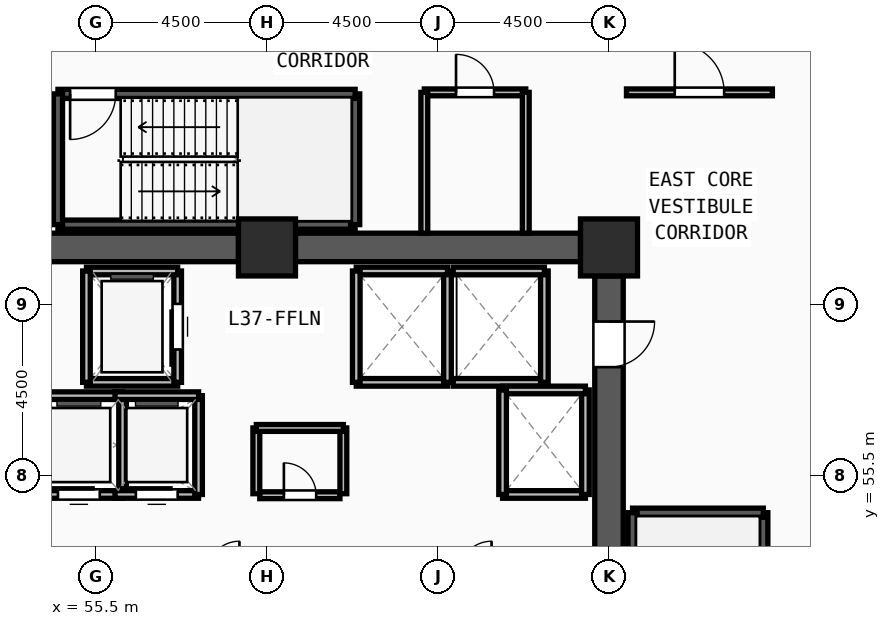
"""IFC4 building model, lengths in metres.
Left out: names, types, materials, properties, quantities, classifications, styles, units other than length and angle.
Written with IfcOpenShell. Run it as: python <this file> out.ifc"""

import sys

from ifc_helpers import new_model, si_unit, direction, frame, frame_2d, origin, origin_2d, place, context, subcontext, project, spatial, rectangle, extrude, source, transform, mapped, element, fill, save


model = new_model("IFC4")
c1 = context("Model", 3, precision=1e-05, world=origin(), true_north=direction((0.0, 1.0)))
c2 = subcontext(c1, "Body", "Model", "MODEL_VIEW")
j1 = project(units=[si_unit("LENGTHUNIT", "METRE"), si_unit("PLANEANGLEUNIT", "RADIAN")], contexts=[c1])
p1 = place(None, origin())
s1 = spatial("IfcSite", under=j1, at=p1, CompositionType="ELEMENT")
p2 = place(p1, origin())
s2 = spatial("IfcBuilding", under=s1, at=p2, CompositionType="ELEMENT")
p3 = place(p2, frame((0.0, 0.0, 144.0)))
s3 = spatial("IfcBuildingStorey", under=s2, at=p3, CompositionType="ELEMENT", Elevation=144.0)
m1 = source(origin(), c2, "Body", "SweptSolid", [
    extrude(rectangle(XDim=1.5, YDim=1.5, at=origin_2d()), origin(), (0.0, 0.0, 1.0), 3.75),
])
for number, where, z_axis, x_axis in (
    (1, (69.0, 61.5, 0.0), (0.0, 0.0, 1.0), (1.0, 0.0, 0.0)),
    (2, (60.0, 61.5, 0.0), (0.0, 0.0, 1.0), (1.0, 0.0, 0.0)),
):
    element("IfcColumn", number, at=place(p3, frame(where, z_axis=z_axis, x_axis=x_axis)), inside=s3, PredefinedType="COLUMN", context=c2, shape_type="MappedRepresentation", body=[
        mapped(m1, transform((0.0, 0.0, 0.0), x_axis=(1.0, 0.0, 0.0), y_axis=(0.0, 1.0, 0.0), z_axis=(0.0, 0.0, 1.0), scale=1.0)),
    ])
for number, where, z_axis, x_axis in (
    (3, (51.75, 61.5, 0.0), (0.0, 0.0, 1.0), (1.0, 0.0, 0.0)),
    (4, (60.75, 61.5, 0.0), (0.0, 0.0, 1.0), (1.0, 0.0, 0.0)),
):
    element("IfcWall", number, at=place(p3, frame(where, z_axis=z_axis, x_axis=x_axis)), inside=s3, PredefinedType="SHEAR", context=c2, shape_type="SweptSolid", body=[
        extrude(rectangle(XDim=7.5, YDim=0.75, at=frame_2d((3.75, 0.0))), origin(), (0.0, 0.0, 1.0), 3.57),
    ])
p4 = place(p3, frame((69.0, 60.75, 0.0), z_axis=(0.0, 0.0, 1.0), x_axis=(0.0, -1.0, 0.0)))
e5 = element("IfcWall", 5, at=p4, inside=s3, PredefinedType="SHEAR", context=c2, shape_type="SweptSolid", body=[
    extrude(rectangle(XDim=13.5, YDim=0.75, at=frame_2d((6.75, 0.0))), origin(), (0.0, 0.0, 1.0), 3.57),
])
m2 = source(origin(), c2, "Body", "SweptSolid", [
    extrude(rectangle(XDim=1.2, YDim=2.2, at=frame_2d((0.6, 1.1))), frame((0.0, 0.385, 0.0), z_axis=(0.0, -1.0, 0.0), x_axis=(1.0, 0.0, 0.0)), (0.0, 0.0, 1.0), 0.77),
])
p5 = place(p4, frame((1.2, 0.0, 0.0)))
e6 = element("IfcOpeningElement", 6, at=p5, cuts=e5, PredefinedType="OPENING", context=c2, shape_type="MappedRepresentation", body=[
    mapped(m2, transform((0.0, 0.0, 0.0), x_axis=(1.0, 0.0, 0.0), y_axis=(0.0, 1.0, 0.0), z_axis=(0.0, 0.0, 1.0), scale=1.0)),
])
p6 = place(p3, frame((73.06, 46.7, 0.0), z_axis=(0.0, 0.0, 1.0), x_axis=(0.0, 1.0, 0.0)))
e7 = element("IfcWall", 7, at=p6, inside=s3, PredefinedType="SOLIDWALL", context=c2, shape_type="SweptSolid", body=[
    extrude(rectangle(XDim=7.82, YDim=0.24, at=frame_2d((3.91, 0.0))), origin(), (0.0, 0.0, 1.0), 3.57),
])
m3 = source(origin(), c2, "Body", "SweptSolid", [
    extrude(rectangle(XDim=1.2, YDim=2.2, at=frame_2d((0.6, 1.1))), frame((0.0, 0.13, 0.0), z_axis=(0.0, -1.0, 0.0), x_axis=(1.0, 0.0, 0.0)), (0.0, 0.0, 1.0), 0.26),
])
p7 = place(p6, frame((0.32, 0.0, 0.0)))
e8 = element("IfcOpeningElement", 8, at=p7, cuts=e7, PredefinedType="OPENING", context=c2, shape_type="MappedRepresentation", body=[
    mapped(m3, transform((0.0, 0.0, 0.0), x_axis=(1.0, 0.0, 0.0), y_axis=(0.0, 1.0, 0.0), z_axis=(0.0, 0.0, 1.0), scale=1.0)),
])
p8 = place(p3, frame((73.06, 54.52, 0.0), z_axis=(0.0, 0.0, 1.0), x_axis=(-1.0, 0.0, 0.0)))
e9 = element("IfcWall", 9, at=p8, inside=s3, PredefinedType="SOLIDWALL", context=c2, shape_type="SweptSolid", body=[
    extrude(rectangle(XDim=3.44, YDim=0.24, at=frame_2d((1.72, 0.0))), origin(), (0.0, 0.0, 1.0), 3.57),
])
for number, where, z_axis, x_axis in (
    (10, (69.62, 54.52, 0.0), (0.0, 0.0, 1.0), (0.0, -1.0, 0.0)),
    (11, (54.5, 62.1, 0.0), (0.0, 0.0, 1.0), (1.0, 0.0, 0.0)),
):
    element("IfcWall", number, at=place(p3, frame(where, z_axis=z_axis, x_axis=x_axis)), inside=s3, PredefinedType="SOLIDWALL", context=c2, shape_type="SweptSolid", body=[
        extrude(rectangle(XDim=7.82, YDim=0.24, at=frame_2d((3.91, 0.0))), origin(), (0.0, 0.0, 1.0), 3.57),
    ])
p9 = place(p3, frame((62.32, 62.1, 0.0), z_axis=(0.0, 0.0, 1.0), x_axis=(0.0, 1.0, 0.0)))
e12 = element("IfcWall", 12, at=p9, inside=s3, PredefinedType="SOLIDWALL", context=c2, shape_type="SweptSolid", body=[
    extrude(rectangle(XDim=3.44, YDim=0.24, at=frame_2d((1.72, 0.0))), origin(), (0.0, 0.0, 1.0), 3.57),
])
p10 = place(p3, frame((62.32, 65.54, 0.0), z_axis=(0.0, 0.0, 1.0), x_axis=(-1.0, 0.0, 0.0)))
e13 = element("IfcWall", 13, at=p10, inside=s3, PredefinedType="SOLIDWALL", context=c2, shape_type="SweptSolid", body=[
    extrude(rectangle(XDim=7.82, YDim=0.24, at=frame_2d((3.91, 0.0))), origin(), (0.0, 0.0, 1.0), 3.57),
])
p11 = place(p10, frame((6.3, 0.0, 0.0)))
e14 = element("IfcOpeningElement", 14, at=p11, cuts=e13, PredefinedType="OPENING", context=c2, shape_type="MappedRepresentation", body=[
    mapped(m3, transform((0.0, 0.0, 0.0), x_axis=(1.0, 0.0, 0.0), y_axis=(0.0, 1.0, 0.0), z_axis=(0.0, 0.0, 1.0), scale=1.0)),
])
p12 = place(p3, frame((54.5, 65.54, 0.0), z_axis=(0.0, 0.0, 1.0), x_axis=(0.0, -1.0, 0.0)))
e15 = element("IfcWall", 15, at=p12, inside=s3, PredefinedType="SOLIDWALL", context=c2, shape_type="SweptSolid", body=[
    extrude(rectangle(XDim=3.44, YDim=0.24, at=frame_2d((1.72, 0.0))), origin(), (0.0, 0.0, 1.0), 3.57),
])
p13 = place(p3, frame((55.25, 57.95, 0.0), z_axis=(0.0, 0.0, 1.0), x_axis=(1.0, 0.0, 0.0)))
e16 = element("IfcWall", 16, at=p13, inside=s3, PredefinedType="SOLIDWALL", context=c2, shape_type="SweptSolid", body=[
    extrude(rectangle(XDim=2.4, YDim=0.2, at=frame_2d((1.2, 0.0))), origin(), (0.0, 0.0, 1.0), 3.57),
])
p14 = place(p3, frame((57.65, 57.95, 0.0), z_axis=(0.0, 0.0, 1.0), x_axis=(0.0, 1.0, 0.0)))
e17 = element("IfcWall", 17, at=p14, inside=s3, PredefinedType="SOLIDWALL", context=c2, shape_type="SweptSolid", body=[
    extrude(rectangle(XDim=2.93, YDim=0.2, at=frame_2d((1.465, 0.0))), origin(), (0.0, 0.0, 1.0), 3.57),
])
m4 = source(origin(), c2, "Body", "SweptSolid", [
    extrude(rectangle(XDim=1.2, YDim=2.3, at=frame_2d((0.6, 1.15))), frame((0.0, 0.11, 0.0), z_axis=(0.0, -1.0, 0.0), x_axis=(1.0, 0.0, 0.0)), (0.0, 0.0, 1.0), 0.22),
])
p15 = place(p14, frame((0.865, 0.0, 0.0)))
e18 = element("IfcOpeningElement", 18, at=p15, cuts=e17, PredefinedType="OPENING", context=c2, shape_type="MappedRepresentation", body=[
    mapped(m4, transform((0.0, 0.0, 0.0), x_axis=(1.0, 0.0, 0.0), y_axis=(0.0, 1.0, 0.0), z_axis=(0.0, 0.0, 1.0), scale=1.0)),
])
p16 = place(p3, frame((57.65, 60.88, 0.0), z_axis=(0.0, 0.0, 1.0), x_axis=(-1.0, 0.0, 0.0)))
e19 = element("IfcWall", 19, at=p16, inside=s3, PredefinedType="SOLIDWALL", context=c2, shape_type="SweptSolid", body=[
    extrude(rectangle(XDim=2.4, YDim=0.2, at=frame_2d((1.2, 0.0))), origin(), (0.0, 0.0, 1.0), 3.57),
])
p17 = place(p3, frame((55.25, 60.88, 0.0), z_axis=(0.0, 0.0, 1.0), x_axis=(0.0, -1.0, 0.0)))
e20 = element("IfcWall", 20, at=p17, inside=s3, PredefinedType="SOLIDWALL", context=c2, shape_type="SweptSolid", body=[
    extrude(rectangle(XDim=2.93, YDim=0.2, at=frame_2d((1.465, 0.0))), origin(), (0.0, 0.0, 1.0), 3.57),
])
p18 = place(p3, frame((62.35, 57.95, 0.0), z_axis=(0.0, 0.0, 1.0), x_axis=(1.0, 0.0, 0.0)))
e21 = element("IfcWall", 21, at=p18, inside=s3, PredefinedType="SOLIDWALL", context=c2, shape_type="SweptSolid", body=[
    extrude(rectangle(XDim=2.4, YDim=0.2, at=frame_2d((1.2, 0.0))), origin(), (0.0, 0.0, 1.0), 3.57),
])
p19 = place(p3, frame((64.75, 57.95, 0.0), z_axis=(0.0, 0.0, 1.0), x_axis=(0.0, 1.0, 0.0)))
e22 = element("IfcWall", 22, at=p19, inside=s3, PredefinedType="SOLIDWALL", context=c2, shape_type="SweptSolid", body=[
    extrude(rectangle(XDim=2.93, YDim=0.2, at=frame_2d((1.465, 0.0))), origin(), (0.0, 0.0, 1.0), 3.57),
])
p20 = place(p3, frame((64.75, 60.88, 0.0), z_axis=(0.0, 0.0, 1.0), x_axis=(-1.0, 0.0, 0.0)))
e23 = element("IfcWall", 23, at=p20, inside=s3, PredefinedType="SOLIDWALL", context=c2, shape_type="SweptSolid", body=[
    extrude(rectangle(XDim=2.4, YDim=0.2, at=frame_2d((1.2, 0.0))), origin(), (0.0, 0.0, 1.0), 3.57),
])
p21 = place(p3, frame((62.35, 60.88, 0.0), z_axis=(0.0, 0.0, 1.0), x_axis=(0.0, -1.0, 0.0)))
e24 = element("IfcWall", 24, at=p21, inside=s3, PredefinedType="SOLIDWALL", context=c2, shape_type="SweptSolid", body=[
    extrude(rectangle(XDim=2.93, YDim=0.2, at=frame_2d((1.465, 0.0))), origin(), (0.0, 0.0, 1.0), 3.57),
])
p22 = place(p3, frame((64.9, 57.95, 0.0), z_axis=(0.0, 0.0, 1.0), x_axis=(1.0, 0.0, 0.0)))
e25 = element("IfcWall", 25, at=p22, inside=s3, PredefinedType="SOLIDWALL", context=c2, shape_type="SweptSolid", body=[
    extrude(rectangle(XDim=2.4, YDim=0.2, at=frame_2d((1.2, 0.0))), origin(), (0.0, 0.0, 1.0), 3.57),
])
p23 = place(p3, frame((67.3, 57.95, 0.0), z_axis=(0.0, 0.0, 1.0), x_axis=(0.0, 1.0, 0.0)))
e26 = element("IfcWall", 26, at=p23, inside=s3, PredefinedType="SOLIDWALL", context=c2, shape_type="SweptSolid", body=[
    extrude(rectangle(XDim=2.93, YDim=0.2, at=frame_2d((1.465, 0.0))), origin(), (0.0, 0.0, 1.0), 3.57),
])
p24 = place(p3, frame((67.3, 60.88, 0.0), z_axis=(0.0, 0.0, 1.0), x_axis=(-1.0, 0.0, 0.0)))
e27 = element("IfcWall", 27, at=p24, inside=s3, PredefinedType="SOLIDWALL", context=c2, shape_type="SweptSolid", body=[
    extrude(rectangle(XDim=2.4, YDim=0.2, at=frame_2d((1.2, 0.0))), origin(), (0.0, 0.0, 1.0), 3.57),
])
p25 = place(p3, frame((66.2, 55.0, 0.0), z_axis=(0.0, 0.0, 1.0), x_axis=(1.0, 0.0, 0.0)))
e28 = element("IfcWall", 28, at=p25, inside=s3, PredefinedType="SOLIDWALL", context=c2, shape_type="SweptSolid", body=[
    extrude(rectangle(XDim=2.18, YDim=0.2, at=frame_2d((1.09, 0.0))), origin(), (0.0, 0.0, 1.0), 3.57),
])
p26 = place(p3, frame((68.38, 55.0, 0.0), z_axis=(0.0, 0.0, 1.0), x_axis=(0.0, 1.0, 0.0)))
e29 = element("IfcWall", 29, at=p26, inside=s3, PredefinedType="SOLIDWALL", context=c2, shape_type="SweptSolid", body=[
    extrude(rectangle(XDim=2.75, YDim=0.2, at=frame_2d((1.375, 0.0))), origin(), (0.0, 0.0, 1.0), 3.57),
])
p27 = place(p3, frame((68.38, 57.75, 0.0), z_axis=(0.0, 0.0, 1.0), x_axis=(-1.0, 0.0, 0.0)))
e30 = element("IfcWall", 30, at=p27, inside=s3, PredefinedType="SOLIDWALL", context=c2, shape_type="SweptSolid", body=[
    extrude(rectangle(XDim=2.18, YDim=0.2, at=frame_2d((1.09, 0.0))), origin(), (0.0, 0.0, 1.0), 3.57),
])
p28 = place(p3, frame((66.2, 57.75, 0.0), z_axis=(0.0, 0.0, 1.0), x_axis=(0.0, -1.0, 0.0)))
e31 = element("IfcWall", 31, at=p28, inside=s3, PredefinedType="SOLIDWALL", context=c2, shape_type="SweptSolid", body=[
    extrude(rectangle(XDim=2.75, YDim=0.2, at=frame_2d((1.375, 0.0))), origin(), (0.0, 0.0, 1.0), 3.57),
])
p29 = place(p3, frame((53.9, 55.0, 0.0), z_axis=(0.0, 0.0, 1.0), x_axis=(1.0, 0.0, 0.0)))
e32 = element("IfcWall", 32, at=p29, inside=s3, PredefinedType="SOLIDWALL", context=c2, shape_type="SweptSolid", body=[
    extrude(rectangle(XDim=2.3, YDim=0.2, at=frame_2d((1.15, 0.0))), origin(), (0.0, 0.0, 1.0), 3.57),
])
m5 = source(origin(), c2, "Body", "SweptSolid", [
    extrude(rectangle(XDim=1.1, YDim=2.2, at=frame_2d((0.55, 1.1))), frame((0.0, 0.11, 0.0), z_axis=(0.0, -1.0, 0.0), x_axis=(1.0, 0.0, 0.0)), (0.0, 0.0, 1.0), 0.22),
])
p30 = place(p29, frame((0.6, 0.0, 0.0)))
e33 = element("IfcOpeningElement", 33, at=p30, cuts=e32, PredefinedType="OPENING", context=c2, shape_type="MappedRepresentation", body=[
    mapped(m5, transform((0.0, 0.0, 0.0), x_axis=(1.0, 0.0, 0.0), y_axis=(0.0, 1.0, 0.0), z_axis=(0.0, 0.0, 1.0), scale=1.0)),
])
p31 = place(p3, frame((56.2, 55.0, 0.0), z_axis=(0.0, 0.0, 1.0), x_axis=(0.0, 1.0, 0.0)))
e34 = element("IfcWall", 34, at=p31, inside=s3, PredefinedType="SOLIDWALL", context=c2, shape_type="SweptSolid", body=[
    extrude(rectangle(XDim=2.6, YDim=0.2, at=frame_2d((1.3, 0.0))), origin(), (0.0, 0.0, 1.0), 3.57),
])
p32 = place(p3, frame((56.2, 57.6, 0.0), z_axis=(0.0, 0.0, 1.0), x_axis=(-1.0, 0.0, 0.0)))
e35 = element("IfcWall", 35, at=p32, inside=s3, PredefinedType="SOLIDWALL", context=c2, shape_type="SweptSolid", body=[
    extrude(rectangle(XDim=2.3, YDim=0.2, at=frame_2d((1.15, 0.0))), origin(), (0.0, 0.0, 1.0), 3.57),
])
p33 = place(p3, frame((56.0, 55.0, 0.0), z_axis=(0.0, 0.0, 1.0), x_axis=(1.0, 0.0, 0.0)))
e36 = element("IfcWall", 36, at=p33, inside=s3, PredefinedType="SOLIDWALL", context=c2, shape_type="SweptSolid", body=[
    extrude(rectangle(XDim=2.2, YDim=0.2, at=frame_2d((1.1, 0.0))), origin(), (0.0, 0.0, 1.0), 3.57),
])
p34 = place(p33, frame((0.55, 0.0, 0.0)))
e37 = element("IfcOpeningElement", 37, at=p34, cuts=e36, PredefinedType="OPENING", context=c2, shape_type="MappedRepresentation", body=[
    mapped(m5, transform((0.0, 0.0, 0.0), x_axis=(1.0, 0.0, 0.0), y_axis=(0.0, 1.0, 0.0), z_axis=(0.0, 0.0, 1.0), scale=1.0)),
])
p35 = place(p3, frame((58.2, 55.0, 0.0), z_axis=(0.0, 0.0, 1.0), x_axis=(0.0, 1.0, 0.0)))
e38 = element("IfcWall", 38, at=p35, inside=s3, PredefinedType="SOLIDWALL", context=c2, shape_type="SweptSolid", body=[
    extrude(rectangle(XDim=2.6, YDim=0.2, at=frame_2d((1.3, 0.0))), origin(), (0.0, 0.0, 1.0), 3.57),
])
p36 = place(p3, frame((58.2, 57.6, 0.0), z_axis=(0.0, 0.0, 1.0), x_axis=(-1.0, 0.0, 0.0)))
e39 = element("IfcWall", 39, at=p36, inside=s3, PredefinedType="SOLIDWALL", context=c2, shape_type="SweptSolid", body=[
    extrude(rectangle(XDim=2.2, YDim=0.2, at=frame_2d((1.1, 0.0))), origin(), (0.0, 0.0, 1.0), 3.57),
])
p37 = place(p3, frame((59.81, 54.98, 0.0), z_axis=(0.0, 0.0, 1.0), x_axis=(1.0, 0.0, 0.0)))
e40 = element("IfcWall", 40, at=p37, inside=s3, PredefinedType="PARTITIONING", context=c2, shape_type="SweptSolid", body=[
    extrude(rectangle(XDim=2.11, YDim=0.18, at=frame_2d((1.055, 0.0))), origin(), (0.0, 0.0, 1.0), 3.57),
])
m6 = source(origin(), c2, "Body", "SweptSolid", [
    extrude(rectangle(XDim=0.85, YDim=2.1, at=frame_2d((0.425, 1.05))), frame((0.0, 0.1, 0.0), z_axis=(0.0, -1.0, 0.0), x_axis=(1.0, 0.0, 0.0)), (0.0, 0.0, 1.0), 0.2),
])
p38 = place(p37, frame((0.635, 0.0, 0.0)))
e41 = element("IfcOpeningElement", 41, at=p38, cuts=e40, PredefinedType="OPENING", context=c2, shape_type="MappedRepresentation", body=[
    mapped(m6, transform((0.0, 0.0, 0.0), x_axis=(1.0, 0.0, 0.0), y_axis=(0.0, 1.0, 0.0), z_axis=(0.0, 0.0, 1.0), scale=1.0)),
])
p39 = place(p3, frame((64.14, 65.58, 0.0), z_axis=(0.0, 0.0, 1.0), x_axis=(1.0, 0.0, 0.0)))
e42 = element("IfcWall", 42, at=p39, inside=s3, PredefinedType="PARTITIONING", context=c2, shape_type="SweptSolid", body=[
    extrude(rectangle(XDim=2.67, YDim=0.18, at=frame_2d((1.335, 0.0))), origin(), (0.0, 0.0, 1.0), 3.57),
])
m7 = source(origin(), c2, "Body", "SweptSolid", [
    extrude(rectangle(XDim=1.0, YDim=2.2, at=frame_2d((0.5, 1.1))), frame((0.0, 0.1, 0.0), z_axis=(0.0, -1.0, 0.0), x_axis=(1.0, 0.0, 0.0)), (0.0, 0.0, 1.0), 0.2),
])
p40 = place(p39, frame((0.835, 0.0, 0.0)))
e43 = element("IfcOpeningElement", 43, at=p40, cuts=e42, PredefinedType="OPENING", context=c2, shape_type="MappedRepresentation", body=[
    mapped(m7, transform((0.0, 0.0, 0.0), x_axis=(1.0, 0.0, 0.0), y_axis=(0.0, 1.0, 0.0), z_axis=(0.0, 0.0, 1.0), scale=1.0)),
])
p41 = place(p3, frame((69.46, 65.58, 0.0), z_axis=(0.0, 0.0, 1.0), x_axis=(1.0, 0.0, 0.0)))
e44 = element("IfcWall", 44, at=p41, inside=s3, PredefinedType="PARTITIONING", context=c2, shape_type="SweptSolid", body=[
    extrude(rectangle(XDim=3.84, YDim=0.18, at=frame_2d((1.92, 0.0))), origin(), (0.0, 0.0, 1.0), 3.57),
])
m8 = source(origin(), c2, "Body", "SweptSolid", [
    extrude(rectangle(XDim=1.3, YDim=2.2, at=frame_2d((0.65, 1.1))), frame((0.0, 0.1, 0.0), z_axis=(0.0, -1.0, 0.0), x_axis=(1.0, 0.0, 0.0)), (0.0, 0.0, 1.0), 0.2),
])
p42 = place(p41, frame((1.27, 0.0, 0.0)))
e45 = element("IfcOpeningElement", 45, at=p42, cuts=e44, PredefinedType="OPENING", context=c2, shape_type="MappedRepresentation", body=[
    mapped(m8, transform((0.0, 0.0, 0.0), x_axis=(1.0, 0.0, 0.0), y_axis=(0.0, 1.0, 0.0), z_axis=(0.0, 0.0, 1.0), scale=1.0)),
])
for number, where, z_axis, x_axis in (
    (46, (59.72, 55.02, 0.0), (0.0, 0.0, 1.0), (0.0, 1.0, 0.0)),
    (47, (62.01, 55.02, 0.0), (0.0, 0.0, 1.0), (0.0, 1.0, 0.0)),
):
    element("IfcWall", number, at=place(p3, frame(where, z_axis=z_axis, x_axis=x_axis)), inside=s3, PredefinedType="PARTITIONING", context=c2, shape_type="SweptSolid", body=[
        extrude(rectangle(XDim=1.73, YDim=0.18, at=frame_2d((0.865, 0.0))), origin(), (0.0, 0.0, 1.0), 3.57),
    ])
p43 = place(p3, frame((59.72, 56.75, 0.0), z_axis=(0.0, 0.0, 1.0), x_axis=(1.0, 0.0, 0.0)))
e48 = element("IfcWall", 48, at=p43, inside=s3, PredefinedType="PARTITIONING", context=c2, shape_type="SweptSolid", body=[
    extrude(rectangle(XDim=2.29, YDim=0.18, at=frame_2d((1.145, 0.0))), origin(), (0.0, 0.0, 1.0), 3.57),
])
for number, where, z_axis, x_axis in (
    (49, (64.14, 61.875, 0.0), (0.0, 0.0, 1.0), (0.0, 1.0, 0.0)),
    (50, (66.81, 61.875, 0.0), (0.0, 0.0, 1.0), (0.0, 1.0, 0.0)),
):
    element("IfcWall", number, at=place(p3, frame(where, z_axis=z_axis, x_axis=x_axis)), inside=s3, PredefinedType="PARTITIONING", context=c2, shape_type="SweptSolid", body=[
        extrude(rectangle(XDim=3.705, YDim=0.18, at=frame_2d((1.853, 0.0))), origin(), (0.0, 0.0, 1.0), 3.57),
    ])
m9 = source(origin(), c2, "Body", "SweptSolid", [
    extrude(rectangle(XDim=1.2, YDim=2.2, at=frame_2d((0.6, 1.1))), frame((0.0, 0.025, 0.0), z_axis=(0.0, -1.0, 0.0), x_axis=(1.0, 0.0, 0.0)), (0.0, 0.0, 1.0), 0.05),
])
p44 = place(p5, origin())
e51 = element("IfcDoor", 51, at=p44, inside=s3, OperationType="SINGLE_SWING_LEFT", PredefinedType="DOOR", context=c2, shape_type="MappedRepresentation", body=[
    mapped(m9, transform((0.0, 0.0, 0.0), x_axis=(1.0, 0.0, 0.0), y_axis=(0.0, 1.0, 0.0), z_axis=(0.0, 0.0, 1.0), scale=1.0)),
])
fill(e6, e51)
p45 = place(p11, origin())
e52 = element("IfcDoor", 52, at=p45, inside=s3, OperationType="SINGLE_SWING_RIGHT", PredefinedType="DOOR", context=c2, shape_type="MappedRepresentation", body=[
    mapped(m9, transform((0.0, 0.0, 0.0), x_axis=(1.0, 0.0, 0.0), y_axis=(0.0, 1.0, 0.0), z_axis=(0.0, 0.0, 1.0), scale=1.0)),
])
fill(e14, e52)
m10 = source(origin(), c2, "Body", "SweptSolid", [
    extrude(rectangle(XDim=1.2, YDim=2.3, at=frame_2d((0.6, 1.15))), frame((0.0, 0.025, 0.0), z_axis=(0.0, -1.0, 0.0), x_axis=(1.0, 0.0, 0.0)), (0.0, 0.0, 1.0), 0.05),
])
p46 = place(p15, origin())
e53 = element("IfcDoor", 53, at=p46, inside=s3, OperationType="SLIDING_TO_LEFT", PredefinedType="DOOR", context=c2, shape_type="MappedRepresentation", body=[
    mapped(m10, transform((0.0, 0.0, 0.0), x_axis=(1.0, 0.0, 0.0), y_axis=(0.0, 1.0, 0.0), z_axis=(0.0, 0.0, 1.0), scale=1.0)),
])
fill(e18, e53)
m11 = source(origin(), c2, "Body", "SweptSolid", [
    extrude(rectangle(XDim=1.1, YDim=2.2, at=frame_2d((0.55, 1.1))), frame((0.0, 0.025, 0.0), z_axis=(0.0, -1.0, 0.0), x_axis=(1.0, 0.0, 0.0)), (0.0, 0.0, 1.0), 0.05),
])
p47 = place(p30, origin())
e54 = element("IfcDoor", 54, at=p47, inside=s3, OperationType="SLIDING_TO_LEFT", PredefinedType="DOOR", context=c2, shape_type="MappedRepresentation", body=[
    mapped(m11, transform((0.0, 0.0, 0.0), x_axis=(1.0, 0.0, 0.0), y_axis=(0.0, 1.0, 0.0), z_axis=(0.0, 0.0, 1.0), scale=1.0)),
])
fill(e33, e54)
p48 = place(p34, origin())
e55 = element("IfcDoor", 55, at=p48, inside=s3, OperationType="SLIDING_TO_LEFT", PredefinedType="DOOR", context=c2, shape_type="MappedRepresentation", body=[
    mapped(m11, transform((0.0, 0.0, 0.0), x_axis=(1.0, 0.0, 0.0), y_axis=(0.0, 1.0, 0.0), z_axis=(0.0, 0.0, 1.0), scale=1.0)),
])
fill(e37, e55)
m12 = source(origin(), c2, "Body", "SweptSolid", [
    extrude(rectangle(XDim=0.85, YDim=2.1, at=frame_2d((0.425, 1.05))), frame((0.0, 0.025, 0.0), z_axis=(0.0, -1.0, 0.0), x_axis=(1.0, 0.0, 0.0)), (0.0, 0.0, 1.0), 0.05),
])
p49 = place(p38, origin())
e56 = element("IfcDoor", 56, at=p49, inside=s3, OperationType="SINGLE_SWING_LEFT", PredefinedType="DOOR", context=c2, shape_type="MappedRepresentation", body=[
    mapped(m12, transform((0.0, 0.0, 0.0), x_axis=(1.0, 0.0, 0.0), y_axis=(0.0, 1.0, 0.0), z_axis=(0.0, 0.0, 1.0), scale=1.0)),
])
fill(e41, e56)
m13 = source(origin(), c2, "Body", "SweptSolid", [
    extrude(rectangle(XDim=1.0, YDim=2.2, at=frame_2d((0.5, 1.1))), frame((0.0, 0.025, 0.0), z_axis=(0.0, -1.0, 0.0), x_axis=(1.0, 0.0, 0.0)), (0.0, 0.0, 1.0), 0.05),
])
p50 = place(p40, origin())
e57 = element("IfcDoor", 57, at=p50, inside=s3, OperationType="SINGLE_SWING_LEFT", PredefinedType="DOOR", context=c2, shape_type="MappedRepresentation", body=[
    mapped(m13, transform((0.0, 0.0, 0.0), x_axis=(1.0, 0.0, 0.0), y_axis=(0.0, 1.0, 0.0), z_axis=(0.0, 0.0, 1.0), scale=1.0)),
])
fill(e43, e57)
m14 = source(origin(), c2, "Body", "SweptSolid", [
    extrude(rectangle(XDim=1.3, YDim=2.2, at=frame_2d((0.65, 1.1))), frame((0.0, 0.025, 0.0), z_axis=(0.0, -1.0, 0.0), x_axis=(1.0, 0.0, 0.0)), (0.0, 0.0, 1.0), 0.05),
])
p51 = place(p42, origin())
e58 = element("IfcDoor", 58, at=p51, inside=s3, OperationType="SINGLE_SWING_LEFT", PredefinedType="DOOR", context=c2, shape_type="MappedRepresentation", body=[
    mapped(m14, transform((0.0, 0.0, 0.0), x_axis=(1.0, 0.0, 0.0), y_axis=(0.0, 1.0, 0.0), z_axis=(0.0, 0.0, 1.0), scale=1.0)),
])
fill(e45, e58)
save(model, sys.argv[1])
